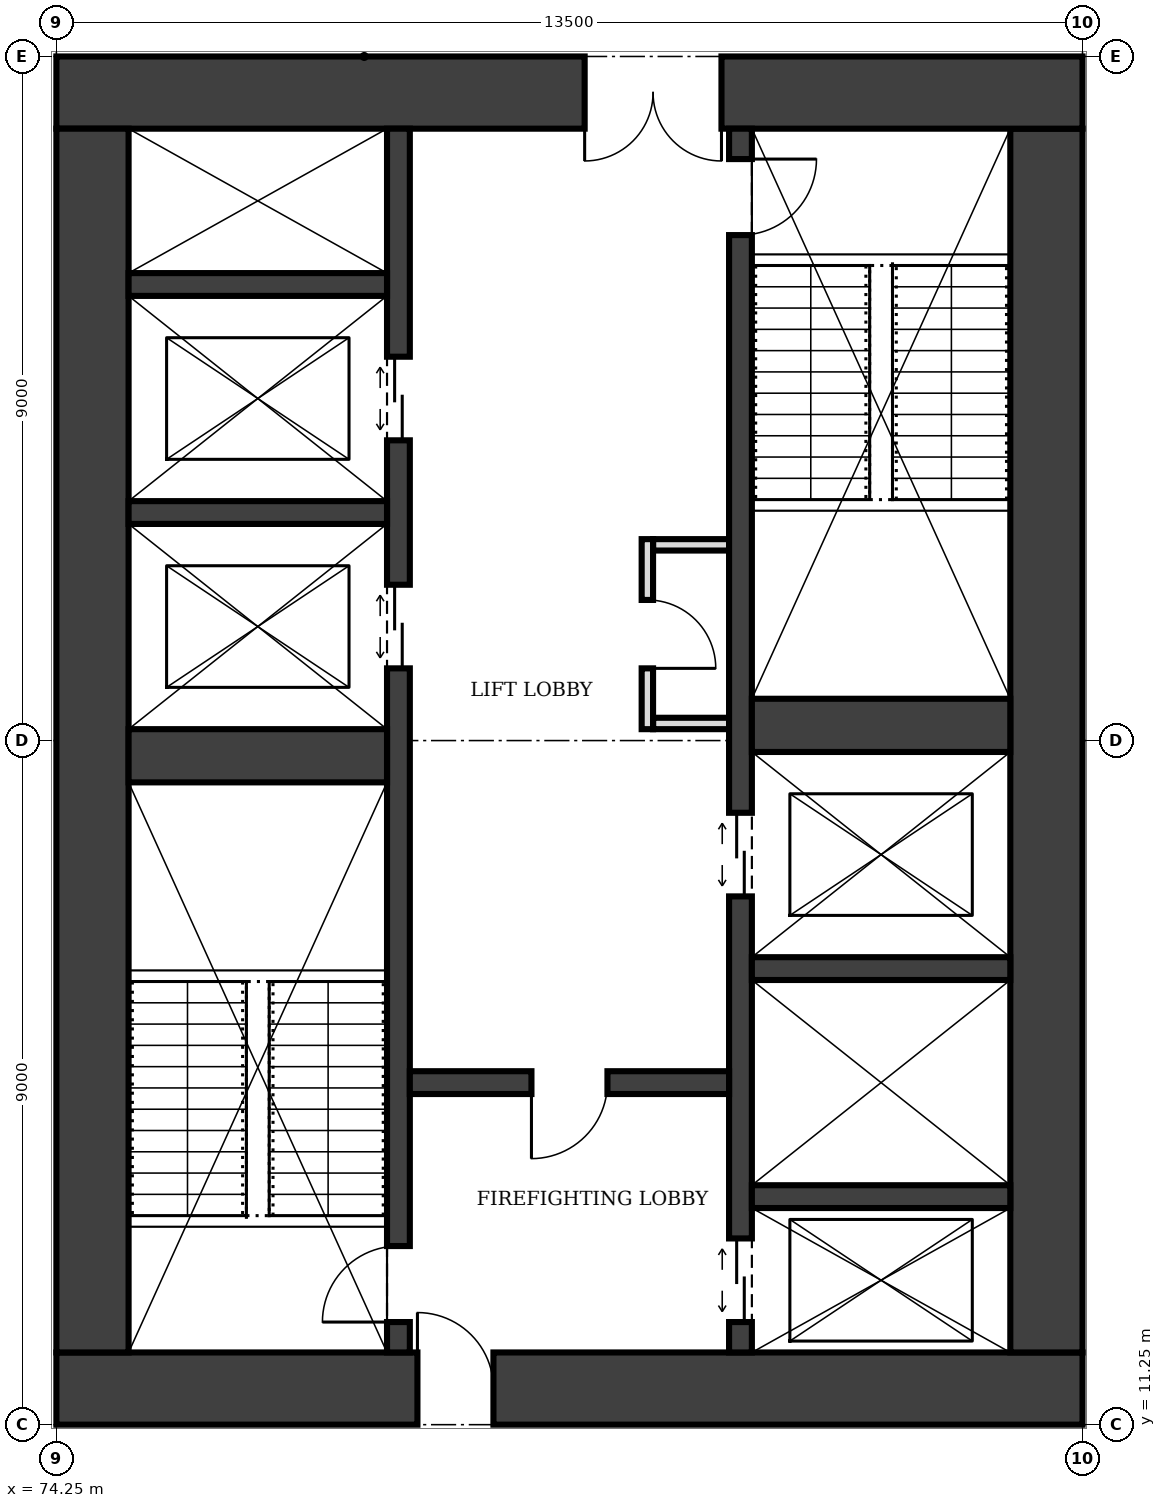
"""IFC4 building model, lengths in metres.
Left out: names, types, materials, properties, quantities, classifications, styles, units other than length and angle.
Written with IfcOpenShell. Run it as: python <this file> out.ifc"""

import sys

from ifc_helpers import new_model, si_unit, direction, frame, frame_2d, origin, place, context, subcontext, project, spatial, rectangle, extrude, element, fill, save


model = new_model("IFC4")
c1 = context("Model", 3, precision=1e-05, world=origin(), true_north=direction((0.0, 1.0)))
c2 = subcontext(c1, "Body", "Model", "MODEL_VIEW")
j1 = project(units=[si_unit("LENGTHUNIT", "METRE"), si_unit("PLANEANGLEUNIT", "RADIAN")], contexts=[c1])
p1 = place(None, origin())
s1 = spatial("IfcSite", under=j1, at=p1, CompositionType="ELEMENT")
p2 = place(p1, origin())
s2 = spatial("IfcBuilding", under=s1, at=p2, CompositionType="ELEMENT")
p3 = place(p2, frame((0.0, 0.0, 69.0)))
s3 = spatial("IfcBuildingStorey", under=s2, at=p3, CompositionType="ELEMENT", Elevation=69.0)
p4 = place(p3, frame((74.25, 11.725, 0.0), z_axis=(0.0, 0.0, 1.0), x_axis=(1.0, 0.0, 0.0)))
e1 = element("IfcWall", 1, at=p4, inside=s3, PredefinedType="SHEAR", context=c2, shape_type="SweptSolid", body=[
    extrude(rectangle(XDim=13.5, YDim=0.95, at=frame_2d((6.75, 0.0))), origin(), (0.0, 0.0, 1.0), 4.0),
])
p5 = place(p4, frame((4.75, 0.0, 0.0)))
e2 = element("IfcOpeningElement", 2, at=p5, cuts=e1, PredefinedType="OPENING", context=c2, shape_type="SweptSolid", body=[
    extrude(rectangle(XDim=1.0, YDim=2.1, at=frame_2d((0.5, 1.05))), frame((0.0, 0.485, 0.0), z_axis=(0.0, -1.0, 0.0), x_axis=(1.0, 0.0, 0.0)), (0.0, 0.0, 1.0), 0.97),
])
p6 = place(p3, frame((87.275, 12.2, 0.0), z_axis=(0.0, 0.0, 1.0), x_axis=(0.0, 1.0, 0.0)))
e3 = element("IfcWall", 3, at=p6, inside=s3, PredefinedType="SHEAR", context=c2, shape_type="SweptSolid", body=[
    extrude(rectangle(XDim=16.1, YDim=0.95, at=frame_2d((8.05, 0.0))), origin(), (0.0, 0.0, 1.0), 4.0),
])
p7 = place(p3, frame((87.75, 28.775, 0.0), z_axis=(0.0, 0.0, 1.0), x_axis=(-1.0, 0.0, 0.0)))
e4 = element("IfcWall", 4, at=p7, inside=s3, PredefinedType="SHEAR", context=c2, shape_type="SweptSolid", body=[
    extrude(rectangle(XDim=13.5, YDim=0.95, at=frame_2d((6.75, 0.0))), origin(), (0.0, 0.0, 1.0), 4.0),
])
p8 = place(p7, frame((4.75, 0.0, 0.0)))
e5 = element("IfcOpeningElement", 5, at=p8, cuts=e4, PredefinedType="OPENING", context=c2, shape_type="SweptSolid", body=[
    extrude(rectangle(XDim=1.8, YDim=2.1, at=frame_2d((0.9, 1.05))), frame((0.0, 0.485, 0.0), z_axis=(0.0, -1.0, 0.0), x_axis=(1.0, 0.0, 0.0)), (0.0, 0.0, 1.0), 0.97),
])
p9 = place(p3, frame((74.725, 28.3, 0.0), z_axis=(0.0, 0.0, 1.0), x_axis=(0.0, -1.0, 0.0)))
e6 = element("IfcWall", 6, at=p9, inside=s3, PredefinedType="SHEAR", context=c2, shape_type="SweptSolid", body=[
    extrude(rectangle(XDim=16.1, YDim=0.95, at=frame_2d((8.05, 0.0))), origin(), (0.0, 0.0, 1.0), 4.0),
])
p10 = place(p3, frame((78.75, 12.2, 0.0), z_axis=(0.0, 0.0, 1.0), x_axis=(0.0, 1.0, 0.0)))
e7 = element("IfcWall", 7, at=p10, inside=s3, PredefinedType="SHEAR", context=c2, shape_type="SweptSolid", body=[
    extrude(rectangle(XDim=16.1, YDim=0.3, at=frame_2d((8.05, 0.0))), origin(), (0.0, 0.0, 1.0), 4.0),
])
p11 = place(p10, frame((0.4, 0.0, 0.0)))
e8 = element("IfcOpeningElement", 8, at=p11, cuts=e7, PredefinedType="OPENING", context=c2, shape_type="SweptSolid", body=[
    extrude(rectangle(XDim=1.0, YDim=2.1, at=frame_2d((0.5, 1.05))), frame((0.0, 0.16, 0.0), z_axis=(0.0, -1.0, 0.0), x_axis=(1.0, 0.0, 0.0)), (0.0, 0.0, 1.0), 0.32),
])
p12 = place(p10, frame((9.0, 0.0, 0.0)))
e9 = element("IfcOpeningElement", 9, at=p12, cuts=e7, PredefinedType="OPENING", context=c2, shape_type="SweptSolid", body=[
    extrude(rectangle(XDim=1.1, YDim=2.1, at=frame_2d((0.55, 1.05))), frame((0.0, 0.16, 0.0), z_axis=(0.0, -1.0, 0.0), x_axis=(1.0, 0.0, 0.0)), (0.0, 0.0, 1.0), 0.32),
])
p13 = place(p10, frame((12.0, 0.0, 0.0)))
e10 = element("IfcOpeningElement", 10, at=p13, cuts=e7, PredefinedType="OPENING", context=c2, shape_type="SweptSolid", body=[
    extrude(rectangle(XDim=1.1, YDim=2.1, at=frame_2d((0.55, 1.05))), frame((0.0, 0.16, 0.0), z_axis=(0.0, -1.0, 0.0), x_axis=(1.0, 0.0, 0.0)), (0.0, 0.0, 1.0), 0.32),
])
p14 = place(p3, frame((83.25, 12.2, 0.0), z_axis=(0.0, 0.0, 1.0), x_axis=(0.0, 1.0, 0.0)))
e11 = element("IfcWall", 11, at=p14, inside=s3, PredefinedType="SHEAR", context=c2, shape_type="SweptSolid", body=[
    extrude(rectangle(XDim=16.1, YDim=0.3, at=frame_2d((8.05, 0.0))), origin(), (0.0, 0.0, 1.0), 4.0),
])
p15 = place(p14, frame((14.7, 0.0, 0.0)))
e12 = element("IfcOpeningElement", 12, at=p15, cuts=e11, PredefinedType="OPENING", context=c2, shape_type="SweptSolid", body=[
    extrude(rectangle(XDim=1.0, YDim=2.1, at=frame_2d((0.5, 1.05))), frame((0.0, 0.16, 0.0), z_axis=(0.0, -1.0, 0.0), x_axis=(1.0, 0.0, 0.0)), (0.0, 0.0, 1.0), 0.32),
])
p16 = place(p14, frame((0.4, 0.0, 0.0)))
e13 = element("IfcOpeningElement", 13, at=p16, cuts=e11, PredefinedType="OPENING", context=c2, shape_type="SweptSolid", body=[
    extrude(rectangle(XDim=1.1, YDim=2.1, at=frame_2d((0.55, 1.05))), frame((0.0, 0.16, 0.0), z_axis=(0.0, -1.0, 0.0), x_axis=(1.0, 0.0, 0.0)), (0.0, 0.0, 1.0), 0.32),
])
p17 = place(p14, frame((6.0, 0.0, 0.0)))
e14 = element("IfcOpeningElement", 14, at=p17, cuts=e11, PredefinedType="OPENING", context=c2, shape_type="SweptSolid", body=[
    extrude(rectangle(XDim=1.1, YDim=2.1, at=frame_2d((0.55, 1.05))), frame((0.0, 0.16, 0.0), z_axis=(0.0, -1.0, 0.0), x_axis=(1.0, 0.0, 0.0)), (0.0, 0.0, 1.0), 0.32),
])
p18 = place(p3, frame((75.2, 20.05, 0.0), z_axis=(0.0, 0.0, 1.0), x_axis=(1.0, 0.0, 0.0)))
e15 = element("IfcWall", 15, at=p18, inside=s3, PredefinedType="SHEAR", context=c2, shape_type="SweptSolid", body=[
    extrude(rectangle(XDim=3.4, YDim=0.7, at=frame_2d((1.7, 0.0))), origin(), (0.0, 0.0, 1.0), 4.0),
])
p19 = place(p3, frame((78.9, 15.75, 0.0), z_axis=(0.0, 0.0, 1.0), x_axis=(1.0, 0.0, 0.0)))
e16 = element("IfcWall", 16, at=p19, inside=s3, PredefinedType="SHEAR", context=c2, shape_type="SweptSolid", body=[
    extrude(rectangle(XDim=4.2, YDim=0.3, at=frame_2d((2.1, 0.0))), origin(), (0.0, 0.0, 1.0), 4.0),
])
p20 = place(p19, frame((1.6, 0.0, 0.0)))
e17 = element("IfcOpeningElement", 17, at=p20, cuts=e16, PredefinedType="OPENING", context=c2, shape_type="SweptSolid", body=[
    extrude(rectangle(XDim=1.0, YDim=2.1, at=frame_2d((0.5, 1.05))), frame((0.0, 0.16, 0.0), z_axis=(0.0, -1.0, 0.0), x_axis=(1.0, 0.0, 0.0)), (0.0, 0.0, 1.0), 0.32),
])
for number, where, z_axis, x_axis in (
    (18, (83.4, 14.25, 0.0), (0.0, 0.0, 1.0), (1.0, 0.0, 0.0)),
    (19, (83.4, 17.25, 0.0), (0.0, 0.0, 1.0), (1.0, 0.0, 0.0)),
):
    element("IfcWall", number, at=place(p3, frame(where, z_axis=z_axis, x_axis=x_axis)), inside=s3, PredefinedType="SHEAR", context=c2, shape_type="SweptSolid", body=[
        extrude(rectangle(XDim=3.4, YDim=0.3, at=frame_2d((1.7, 0.0))), origin(), (0.0, 0.0, 1.0), 4.0),
    ])
p21 = place(p3, frame((83.4, 20.45, 0.0), z_axis=(0.0, 0.0, 1.0), x_axis=(1.0, 0.0, 0.0)))
e20 = element("IfcWall", 20, at=p21, inside=s3, PredefinedType="SHEAR", context=c2, shape_type="SweptSolid", body=[
    extrude(rectangle(XDim=3.4, YDim=0.7, at=frame_2d((1.7, 0.0))), origin(), (0.0, 0.0, 1.0), 4.0),
])
for number, where, z_axis, x_axis in (
    (21, (75.2, 23.25, 0.0), (0.0, 0.0, 1.0), (1.0, 0.0, 0.0)),
    (22, (75.2, 26.25, 0.0), (0.0, 0.0, 1.0), (1.0, 0.0, 0.0)),
):
    element("IfcWall", number, at=place(p3, frame(where, z_axis=z_axis, x_axis=x_axis)), inside=s3, PredefinedType="SHEAR", context=c2, shape_type="SweptSolid", body=[
        extrude(rectangle(XDim=3.4, YDim=0.3, at=frame_2d((1.7, 0.0))), origin(), (0.0, 0.0, 1.0), 4.0),
    ])
p22 = place(p3, frame((82.025, 20.4, 0.0), z_axis=(0.0, 0.0, 1.0), x_axis=(0.0, 1.0, 0.0)))
e23 = element("IfcWall", 23, at=p22, inside=s3, PredefinedType="PARTITIONING", context=c2, shape_type="SweptSolid", body=[
    extrude(rectangle(XDim=2.5, YDim=0.15, at=frame_2d((1.25, 0.0))), origin(), (0.0, 0.0, 1.0), 3.75),
])
p23 = place(p22, frame((0.8, 0.0, 0.0)))
e24 = element("IfcOpeningElement", 24, at=p23, cuts=e23, PredefinedType="OPENING", context=c2, shape_type="SweptSolid", body=[
    extrude(rectangle(XDim=0.9, YDim=2.1, at=frame_2d((0.45, 1.05))), frame((0.0, 0.085, 0.0), z_axis=(0.0, -1.0, 0.0), x_axis=(1.0, 0.0, 0.0)), (0.0, 0.0, 1.0), 0.17),
])
for number, where, z_axis, x_axis in (
    (25, (82.1, 20.475, 0.0), (0.0, 0.0, 1.0), (1.0, 0.0, 0.0)),
    (26, (82.1, 22.825, 0.0), (0.0, 0.0, 1.0), (1.0, 0.0, 0.0)),
):
    element("IfcWall", number, at=place(p3, frame(where, z_axis=z_axis, x_axis=x_axis)), inside=s3, PredefinedType="PARTITIONING", context=c2, shape_type="SweptSolid", body=[
        extrude(rectangle(XDim=1.0, YDim=0.15, at=frame_2d((0.5, 0.0))), origin(), (0.0, 0.0, 1.0), 3.75),
    ])
p24 = place(p5, origin())
e27 = element("IfcDoor", 27, at=p24, inside=s3, OperationType="SINGLE_SWING_LEFT", PredefinedType="DOOR", context=c2, shape_type="SweptSolid", body=[
    extrude(rectangle(XDim=1.0, YDim=2.1, at=frame_2d((0.5, 1.05))), frame((0.0, 0.025, 0.0), z_axis=(0.0, -1.0, 0.0), x_axis=(1.0, 0.0, 0.0)), (0.0, 0.0, 1.0), 0.05),
])
fill(e2, e27)
p25 = place(p8, origin())
e28 = element("IfcDoor", 28, at=p25, inside=s3, OperationType="DOUBLE_DOOR_SINGLE_SWING", PredefinedType="DOOR", context=c2, shape_type="SweptSolid", body=[
    extrude(rectangle(XDim=1.8, YDim=2.1, at=frame_2d((0.9, 1.05))), frame((0.0, 0.025, 0.0), z_axis=(0.0, -1.0, 0.0), x_axis=(1.0, 0.0, 0.0)), (0.0, 0.0, 1.0), 0.05),
])
fill(e5, e28)
p26 = place(p20, frame((1.0, 0.0, 0.0), z_axis=(0.0, 0.0, 1.0), x_axis=(-1.0, 0.0, 0.0)))
e29 = element("IfcDoor", 29, at=p26, inside=s3, OperationType="SINGLE_SWING_RIGHT", PredefinedType="DOOR", context=c2, shape_type="SweptSolid", body=[
    extrude(rectangle(XDim=1.0, YDim=2.1, at=frame_2d((0.5, 1.05))), frame((0.0, 0.025, 0.0), z_axis=(0.0, -1.0, 0.0), x_axis=(1.0, 0.0, 0.0)), (0.0, 0.0, 1.0), 0.05),
])
fill(e17, e29)
p27 = place(p11, origin())
e30 = element("IfcDoor", 30, at=p27, inside=s3, OperationType="SINGLE_SWING_LEFT", PredefinedType="DOOR", context=c2, shape_type="SweptSolid", body=[
    extrude(rectangle(XDim=1.0, YDim=2.1, at=frame_2d((0.5, 1.05))), frame((0.0, 0.025, 0.0), z_axis=(0.0, -1.0, 0.0), x_axis=(1.0, 0.0, 0.0)), (0.0, 0.0, 1.0), 0.05),
])
fill(e8, e30)
p28 = place(p15, frame((1.0, 0.0, 0.0), z_axis=(0.0, 0.0, 1.0), x_axis=(-1.0, 0.0, 0.0)))
e31 = element("IfcDoor", 31, at=p28, inside=s3, OperationType="SINGLE_SWING_LEFT", PredefinedType="DOOR", context=c2, shape_type="SweptSolid", body=[
    extrude(rectangle(XDim=1.0, YDim=2.1, at=frame_2d((0.5, 1.05))), frame((0.0, 0.025, 0.0), z_axis=(0.0, -1.0, 0.0), x_axis=(1.0, 0.0, 0.0)), (0.0, 0.0, 1.0), 0.05),
])
fill(e12, e31)
p29 = place(p16, origin())
e32 = element("IfcDoor", 32, at=p29, inside=s3, OperationType="DOUBLE_DOOR_SLIDING", PredefinedType="DOOR", context=c2, shape_type="SweptSolid", body=[
    extrude(rectangle(XDim=1.1, YDim=2.1, at=frame_2d((0.55, 1.05))), frame((0.0, 0.025, 0.0), z_axis=(0.0, -1.0, 0.0), x_axis=(1.0, 0.0, 0.0)), (0.0, 0.0, 1.0), 0.05),
])
fill(e13, e32)
p30 = place(p12, origin())
e33 = element("IfcDoor", 33, at=p30, inside=s3, OperationType="DOUBLE_DOOR_SLIDING", PredefinedType="DOOR", context=c2, shape_type="SweptSolid", body=[
    extrude(rectangle(XDim=1.1, YDim=2.1, at=frame_2d((0.55, 1.05))), frame((0.0, 0.025, 0.0), z_axis=(0.0, -1.0, 0.0), x_axis=(1.0, 0.0, 0.0)), (0.0, 0.0, 1.0), 0.05),
])
fill(e9, e33)
p31 = place(p13, origin())
e34 = element("IfcDoor", 34, at=p31, inside=s3, OperationType="DOUBLE_DOOR_SLIDING", PredefinedType="DOOR", context=c2, shape_type="SweptSolid", body=[
    extrude(rectangle(XDim=1.1, YDim=2.1, at=frame_2d((0.55, 1.05))), frame((0.0, 0.025, 0.0), z_axis=(0.0, -1.0, 0.0), x_axis=(1.0, 0.0, 0.0)), (0.0, 0.0, 1.0), 0.05),
])
fill(e10, e34)
p32 = place(p17, origin())
e35 = element("IfcDoor", 35, at=p32, inside=s3, OperationType="DOUBLE_DOOR_SLIDING", PredefinedType="DOOR", context=c2, shape_type="SweptSolid", body=[
    extrude(rectangle(XDim=1.1, YDim=2.1, at=frame_2d((0.55, 1.05))), frame((0.0, 0.025, 0.0), z_axis=(0.0, -1.0, 0.0), x_axis=(1.0, 0.0, 0.0)), (0.0, 0.0, 1.0), 0.05),
])
fill(e14, e35)
p33 = place(p23, frame((0.9, 0.0, 0.0), z_axis=(0.0, 0.0, 1.0), x_axis=(-1.0, 0.0, 0.0)))
e36 = element("IfcDoor", 36, at=p33, inside=s3, OperationType="SINGLE_SWING_RIGHT", PredefinedType="DOOR", context=c2, shape_type="SweptSolid", body=[
    extrude(rectangle(XDim=0.9, YDim=2.1, at=frame_2d((0.45, 1.05))), frame((0.0, 0.025, 0.0), z_axis=(0.0, -1.0, 0.0), x_axis=(1.0, 0.0, 0.0)), (0.0, 0.0, 1.0), 0.05),
])
fill(e24, e36)
save(model, sys.argv[1])
